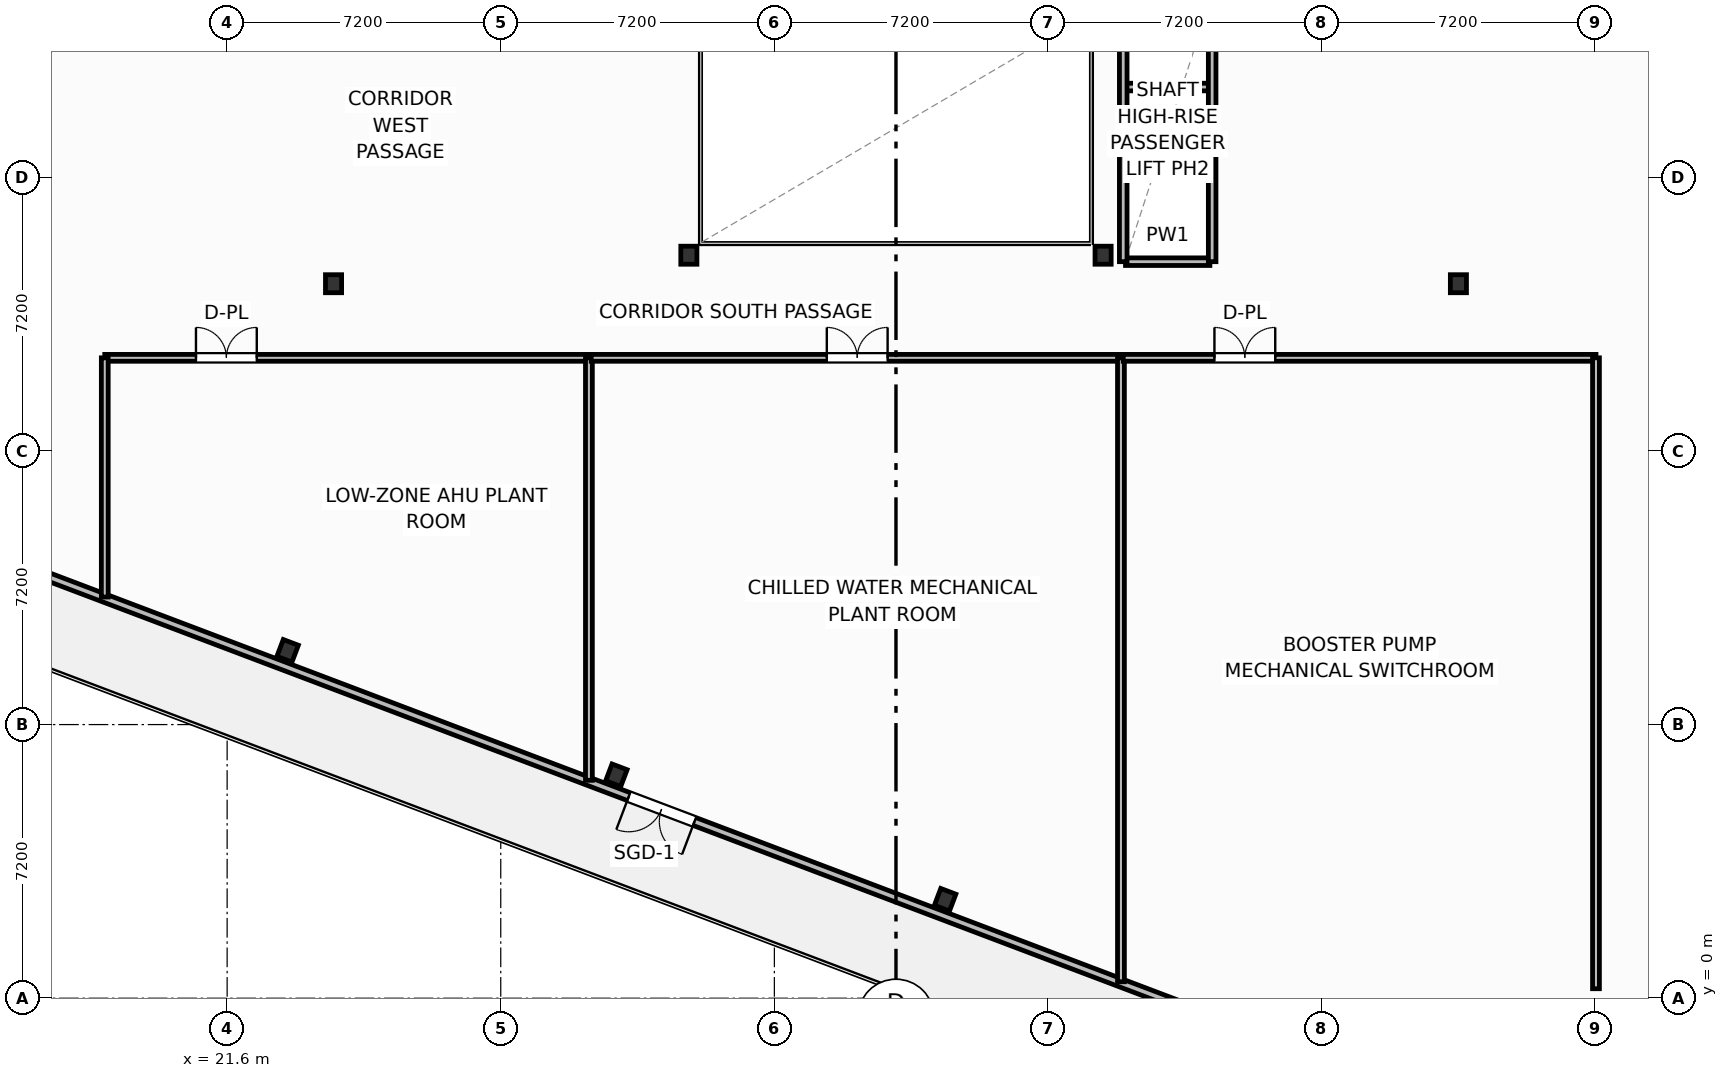
"""IFC4 building model, lengths in metres.
Left out: names, types, materials, properties, quantities, classifications, styles, units other than length and angle.
Written with IfcOpenShell. Run it as: python <this file> out.ifc"""

import sys

from ifc_helpers import new_model, si_unit, direction, frame, frame_2d, origin, origin_2d, place, context, subcontext, project, spatial, rectangle, i_section, extrude, element, fill, save


model = new_model("IFC4")
c1 = context("Model", 3, precision=1e-05, world=origin(), true_north=direction((0.0, 1.0)))
c2 = subcontext(c1, "Body", "Model", "MODEL_VIEW")
j1 = project(units=[si_unit("LENGTHUNIT", "METRE"), si_unit("PLANEANGLEUNIT", "RADIAN")], contexts=[c1])
p1 = place(None, origin())
s1 = spatial("IfcSite", under=j1, at=p1, CompositionType="ELEMENT")
p2 = place(p1, origin())
s2 = spatial("IfcBuilding", under=s1, at=p2, CompositionType="ELEMENT")
p3 = place(p2, frame((0.0, 0.0, 71.4)))
s3 = spatial("IfcBuildingStorey", under=s2, at=p3, CompositionType="ELEMENT", Elevation=71.4)
for number, where, z_axis, x_axis in (
    (1, (33.75, 19.55, 0.0), (0.0, 0.0, 1.0), (1.0, 0.0, 0.0)),
    (2, (44.65, 19.55, 0.0), (0.0, 0.0, 1.0), (1.0, 0.0, 0.0)),
    (3, (24.4, 18.8, 0.0), (0.0, 0.0, 1.0), (1.0, 0.0, 0.0)),
    (4, (54.0, 18.8, 0.0), (0.0, 0.0, 1.0), (1.0, 0.0, 0.0)),
):
    element("IfcColumn", number, at=place(p3, frame(where, z_axis=z_axis, x_axis=x_axis)), inside=s3, PredefinedType="COLUMN", context=c2, shape_type="SweptSolid", body=[
        extrude(i_section(OverallWidth=0.424, OverallDepth=0.474, WebThickness=0.048, FlangeThickness=0.077, FilletRadius=0.025, at=origin_2d()), origin(), (0.0, 0.0, 1.0), 4.8),
    ])
for number, where, z_axis, x_axis in (
    (5, (23.192, 9.141, -0.32), (0.0, 0.0, 1.0), (0.935, -0.354, 0.0)),
    (6, (31.843, 5.866, -0.32), (0.0, 0.0, 1.0), (0.935, -0.354, 0.0)),
    (7, (40.493, 2.591, -0.32), (0.0, 0.0, 1.0), (0.935, -0.354, 0.0)),
):
    element("IfcColumn", number, at=place(p3, frame(where, z_axis=z_axis, x_axis=x_axis)), inside=s3, PredefinedType="COLUMN", context=c2, shape_type="SweptSolid", body=[
        extrude(i_section(OverallWidth=0.424, OverallDepth=0.474, WebThickness=0.048, FlangeThickness=0.077, FilletRadius=0.025, at=origin_2d()), origin(), (0.0, 0.0, 1.0), 5.12),
    ])
p4 = place(p3, frame((59.754, -5.139, 0.0), z_axis=(0.0, 0.0, 1.0), x_axis=(-0.935222250741, 0.354061211825, 0.0)))
e8 = element("IfcWall", 8, at=p4, inside=s3, PredefinedType="SOLIDWALL", context=c2, shape_type="SweptSolid", body=[
    extrude(rectangle(XDim=60.0, YDim=0.22, at=frame_2d((30.0, 0.0))), origin(), (0.0, 0.0, 1.0), 3.83),
])
p5 = place(p4, frame((27.647, 0.0, 0.0)))
e9 = element("IfcOpeningElement", 9, at=p5, cuts=e8, PredefinedType="OPENING", context=c2, shape_type="SweptSolid", body=[
    extrude(rectangle(XDim=1.85, YDim=2.3, at=frame_2d((0.925, 1.15))), frame((0.0, 0.12, 0.0), z_axis=(0.0, -1.0, 0.0), x_axis=(1.0, 0.0, 0.0)), (0.0, 0.0, 1.0), 0.24),
])
p6 = place(p4, frame((0.55, 0.0, 0.75)))
e10 = element("IfcOpeningElement", 10, at=p6, cuts=e8, PredefinedType="OPENING", context=c2, shape_type="SweptSolid", body=[
    extrude(rectangle(XDim=1.65, YDim=1.65, at=frame_2d((0.825, 0.825))), frame((0.0, 0.12, 0.0), z_axis=(0.0, -1.0, 0.0), x_axis=(1.0, 0.0, 0.0)), (0.0, 0.0, 1.0), 0.24),
])
p7 = place(p4, frame((57.8, 0.0, 0.75)))
e11 = element("IfcOpeningElement", 11, at=p7, cuts=e8, PredefinedType="OPENING", context=c2, shape_type="SweptSolid", body=[
    extrude(rectangle(XDim=1.65, YDim=1.65, at=frame_2d((0.825, 0.825))), frame((0.0, 0.12, 0.0), z_axis=(0.0, -1.0, 0.0), x_axis=(1.0, 0.0, 0.0)), (0.0, 0.0, 1.0), 0.24),
])
p8 = place(p3, frame((18.38, 16.85, 0.0), z_axis=(0.0, 0.0, 1.0), x_axis=(1.0, 0.0, 0.0)))
e12 = element("IfcWall", 12, at=p8, inside=s3, PredefinedType="PARTITIONING", context=c2, shape_type="SweptSolid", body=[
    extrude(rectangle(XDim=12.74, YDim=0.18, at=frame_2d((6.37, 0.0))), origin(), (0.0, 0.0, 1.0), 4.55),
])
p9 = place(p8, frame((2.4, 0.0, 0.0)))
e13 = element("IfcOpeningElement", 13, at=p9, cuts=e12, PredefinedType="OPENING", context=c2, shape_type="SweptSolid", body=[
    extrude(rectangle(XDim=1.6, YDim=2.05, at=frame_2d((0.8, 1.025))), frame((0.0, 0.1, 0.0), z_axis=(0.0, -1.0, 0.0), x_axis=(1.0, 0.0, 0.0)), (0.0, 0.0, 1.0), 0.2),
])
p10 = place(p3, frame((31.12, 5.733, 0.0), z_axis=(0.0, 0.0, 1.0), x_axis=(0.0, 1.0, 0.0)))
e14 = element("IfcWall", 14, at=p10, inside=s3, PredefinedType="PARTITIONING", context=c2, shape_type="SweptSolid", body=[
    extrude(rectangle(XDim=11.117, YDim=0.18, at=frame_2d((5.558, 0.0))), origin(), (0.0, 0.0, 1.0), 4.55),
])
p11 = place(p3, frame((18.38, 10.557, 0.0), z_axis=(0.0, 0.0, 1.0), x_axis=(0.0, 1.0, 0.0)))
e15 = element("IfcWall", 15, at=p11, inside=s3, PredefinedType="PARTITIONING", context=c2, shape_type="SweptSolid", body=[
    extrude(rectangle(XDim=6.293, YDim=0.18, at=frame_2d((3.147, 0.0))), origin(), (0.0, 0.0, 1.0), 4.55),
])
p12 = place(p3, frame((31.18, 16.85, 0.0), z_axis=(0.0, 0.0, 1.0), x_axis=(1.0, 0.0, 0.0)))
e16 = element("IfcWall", 16, at=p12, inside=s3, PredefinedType="PARTITIONING", context=c2, shape_type="SweptSolid", body=[
    extrude(rectangle(XDim=13.94, YDim=0.18, at=frame_2d((6.97, 0.0))), origin(), (0.0, 0.0, 1.0), 4.55),
])
p13 = place(p12, frame((6.2, 0.0, 0.0)))
e17 = element("IfcOpeningElement", 17, at=p13, cuts=e16, PredefinedType="OPENING", context=c2, shape_type="SweptSolid", body=[
    extrude(rectangle(XDim=1.6, YDim=2.05, at=frame_2d((0.8, 1.025))), frame((0.0, 0.1, 0.0), z_axis=(0.0, -1.0, 0.0), x_axis=(1.0, 0.0, 0.0)), (0.0, 0.0, 1.0), 0.2),
])
p14 = place(p3, frame((45.12, 0.433, 0.0), z_axis=(0.0, 0.0, 1.0), x_axis=(0.0, 1.0, 0.0)))
e18 = element("IfcWall", 18, at=p14, inside=s3, PredefinedType="PARTITIONING", context=c2, shape_type="SweptSolid", body=[
    extrude(rectangle(XDim=16.417, YDim=0.18, at=frame_2d((8.208, 0.0))), origin(), (0.0, 0.0, 1.0), 4.55),
])
p15 = place(p3, frame((45.18, 16.85, 0.0), z_axis=(0.0, 0.0, 1.0), x_axis=(1.0, 0.0, 0.0)))
e19 = element("IfcWall", 19, at=p15, inside=s3, PredefinedType="PARTITIONING", context=c2, shape_type="SweptSolid", body=[
    extrude(rectangle(XDim=12.44, YDim=0.18, at=frame_2d((6.22, 0.0))), origin(), (0.0, 0.0, 1.0), 4.55),
])
p16 = place(p15, frame((2.4, 0.0, 0.0)))
e20 = element("IfcOpeningElement", 20, at=p16, cuts=e19, PredefinedType="OPENING", context=c2, shape_type="SweptSolid", body=[
    extrude(rectangle(XDim=1.6, YDim=2.05, at=frame_2d((0.8, 1.025))), frame((0.0, 0.1, 0.0), z_axis=(0.0, -1.0, 0.0), x_axis=(1.0, 0.0, 0.0)), (0.0, 0.0, 1.0), 0.2),
])
p17 = place(p3, frame((57.62, 0.25, 0.0), z_axis=(0.0, 0.0, 1.0), x_axis=(0.0, 1.0, 0.0)))
e21 = element("IfcWall", 21, at=p17, inside=s3, PredefinedType="PARTITIONING", context=c2, shape_type="SweptSolid", body=[
    extrude(rectangle(XDim=16.6, YDim=0.18, at=frame_2d((8.3, 0.0))), origin(), (0.0, 0.0, 1.0), 4.55),
])
for number, where, z_axis, x_axis in (
    (22, (45.24, 21.675, 0.0), (0.0, 0.0, 1.0), (1.0, 0.0, 0.0)),
    (23, (45.24, 23.975, 0.0), (0.0, 0.0, 1.0), (1.0, 0.0, 0.0)),
):
    element("IfcWall", number, at=place(p3, frame(where, z_axis=z_axis, x_axis=x_axis)), inside=s3, PredefinedType="PARTITIONING", context=c2, shape_type="SweptSolid", body=[
        extrude(rectangle(XDim=2.22, YDim=0.2, at=frame_2d((1.11, 0.0))), origin(), (0.0, 0.0, 1.0), 4.55),
    ])
p18 = place(p3, frame((45.24, 19.38, 0.0), z_axis=(0.0, 0.0, 1.0), x_axis=(1.0, 0.0, 0.0)))
e24 = element("IfcWall", 24, at=p18, inside=s3, PredefinedType="PARTITIONING", context=c2, shape_type="SweptSolid", body=[
    extrude(rectangle(XDim=2.22, YDim=0.2, at=frame_2d((1.11, 0.0))), origin(), (0.0, 0.0, 1.0), 3.762),
])
for number, where, z_axis, x_axis in (
    (25, (45.18, 19.38, 0.0), (0.0, 0.0, 1.0), (0.0, 1.0, 0.0)),
    (26, (47.52, 19.38, 0.0), (0.0, 0.0, 1.0), (0.0, 1.0, 0.0)),
):
    element("IfcWall", number, at=place(p3, frame(where, z_axis=z_axis, x_axis=x_axis)), inside=s3, PredefinedType="PARTITIONING", context=c2, shape_type="SweptSolid", body=[
        extrude(rectangle(XDim=6.9, YDim=0.2, at=frame_2d((3.45, 0.0))), origin(), (0.0, 0.0, 1.0), 4.55),
    ])
p19 = place(p5, origin())
e27 = element("IfcDoor", 27, at=p19, inside=s3, OperationType="DOUBLE_DOOR_SINGLE_SWING", PredefinedType="DOOR", context=c2, shape_type="SweptSolid", body=[
    extrude(rectangle(XDim=1.85, YDim=2.3, at=frame_2d((0.925, 1.15))), frame((0.0, 0.025, 0.0), z_axis=(0.0, -1.0, 0.0), x_axis=(1.0, 0.0, 0.0)), (0.0, 0.0, 1.0), 0.05),
])
fill(e9, e27)
p20 = place(p9, origin())
e28 = element("IfcDoor", 28, at=p20, inside=s3, OperationType="DOUBLE_DOOR_SINGLE_SWING", PredefinedType="DOOR", context=c2, shape_type="SweptSolid", body=[
    extrude(rectangle(XDim=1.6, YDim=2.05, at=frame_2d((0.8, 1.025))), frame((0.0, 0.025, 0.0), z_axis=(0.0, -1.0, 0.0), x_axis=(1.0, 0.0, 0.0)), (0.0, 0.0, 1.0), 0.05),
])
fill(e13, e28)
p21 = place(p13, origin())
e29 = element("IfcDoor", 29, at=p21, inside=s3, OperationType="DOUBLE_DOOR_SINGLE_SWING", PredefinedType="DOOR", context=c2, shape_type="SweptSolid", body=[
    extrude(rectangle(XDim=1.6, YDim=2.05, at=frame_2d((0.8, 1.025))), frame((0.0, 0.025, 0.0), z_axis=(0.0, -1.0, 0.0), x_axis=(1.0, 0.0, 0.0)), (0.0, 0.0, 1.0), 0.05),
])
fill(e17, e29)
p22 = place(p16, origin())
e30 = element("IfcDoor", 30, at=p22, inside=s3, OperationType="DOUBLE_DOOR_SINGLE_SWING", PredefinedType="DOOR", context=c2, shape_type="SweptSolid", body=[
    extrude(rectangle(XDim=1.6, YDim=2.05, at=frame_2d((0.8, 1.025))), frame((0.0, 0.025, 0.0), z_axis=(0.0, -1.0, 0.0), x_axis=(1.0, 0.0, 0.0)), (0.0, 0.0, 1.0), 0.05),
])
fill(e20, e30)
save(model, sys.argv[1])
